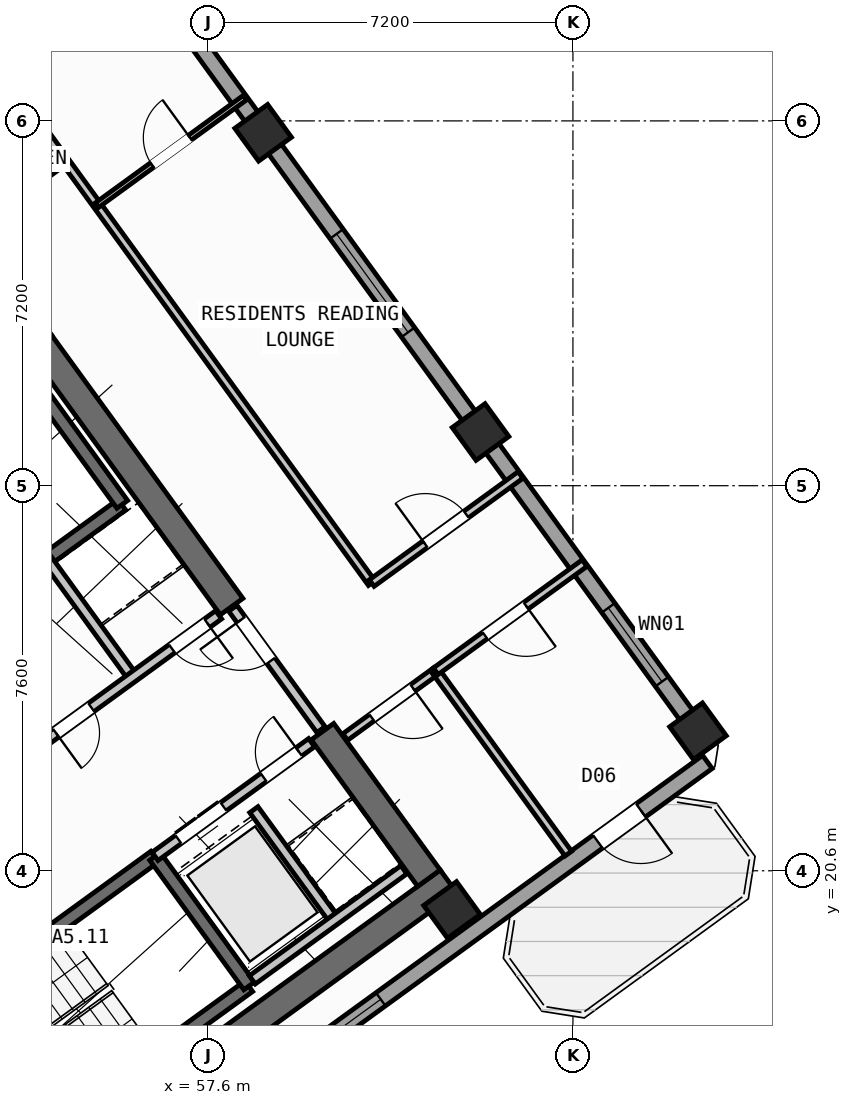
"""IFC4 building model, lengths in metres.
Left out: names, types, materials, properties, quantities, classifications, styles, units other than length and angle.
Written with IfcOpenShell. Run it as: python <this file> out.ifc"""

import sys

from ifc_helpers import new_model, si_unit, direction, frame, frame_2d, origin, origin_2d, place, context, subcontext, project, spatial, rectangle, hollow_rectangle, extrude, source, transform, mapped, element, fill, save


model = new_model("IFC4")
c1 = context("Model", 3, precision=1e-05, world=origin(), true_north=direction((0.0, 1.0)))
c2 = subcontext(c1, "Body", "Model", "MODEL_VIEW")
j1 = project(units=[si_unit("LENGTHUNIT", "METRE"), si_unit("PLANEANGLEUNIT", "RADIAN")], contexts=[c1])
p1 = place(None, origin())
s1 = spatial("IfcSite", under=j1, at=p1, CompositionType="ELEMENT")
p2 = place(p1, origin())
s2 = spatial("IfcBuilding", under=s1, at=p2, CompositionType="ELEMENT")
p3 = place(p2, frame((0.0, 0.0, 179.4)))
s3 = spatial("IfcBuildingStorey", under=s2, at=p3, CompositionType="ELEMENT", Elevation=179.4)
p4 = place(p3, frame((52.359, 13.14, 0.0), z_axis=(0.0, 0.0, 1.0), x_axis=(0.809014896919, 0.587788139183, 0.0)))
e1 = element("IfcWall", 1, at=p4, inside=s3, PredefinedType="SHEAR", context=c2, shape_type="SweptSolid", body=[
    extrude(rectangle(XDim=12.34, YDim=0.55, at=frame_2d((6.17, 0.0))), origin(), (0.0, 0.0, 1.0), 4.55),
])
p5 = place(p3, frame((61.958, 20.454, 0.0), z_axis=(0.0, 0.0, 1.0), x_axis=(-0.587802113096, 0.809004744015, 0.0)))
e2 = element("IfcWall", 2, at=p5, inside=s3, PredefinedType="SHEAR", context=c2, shape_type="SweptSolid", body=[
    extrude(rectangle(XDim=3.575, YDim=0.55, at=frame_2d((1.788, 0.0))), origin(), (0.0, 0.0, 1.0), 4.55),
])
p6 = place(p3, frame((58.064, 25.813, 0.0), z_axis=(0.0, 0.0, 1.0), x_axis=(-0.587764933797, 0.809031756236, 0.0)))
e3 = element("IfcWall", 3, at=p6, inside=s3, PredefinedType="SHEAR", context=c2, shape_type="SweptSolid", body=[
    extrude(rectangle(XDim=6.425, YDim=0.55, at=frame_2d((3.212, 0.0))), origin(), (0.0, 0.0, 1.0), 4.55),
])
m1 = source(origin(), c2, "Body", "SweptSolid", [
    extrude(hollow_rectangle(XDim=0.8, YDim=0.8, WallThickness=0.032, at=origin_2d()), origin(), (0.0, 0.0, 1.0), 4.8),
])
for number, where, z_axis, x_axis in (
    (4, (62.414, 19.827, 0.0), (0.0, 0.0, 1.0), (0.809, 0.588, 0.0)),
    (5, (67.268, 23.354, 0.0), (0.0, 0.0, 1.0), (0.809, 0.588, 0.0)),
    (6, (62.977, 29.259, 0.0), (0.0, 0.0, 1.0), (0.809, 0.588, 0.0)),
    (7, (58.686, 35.165, 0.0), (0.0, 0.0, 1.0), (0.809, 0.588, 0.0)),
):
    element("IfcColumn", number, at=place(p3, frame(where, z_axis=z_axis, x_axis=x_axis)), inside=s3, PredefinedType="COLUMN", context=c2, shape_type="MappedRepresentation", body=[
        mapped(m1, transform((0.0, 0.0, 0.0), scale=1.0)),
    ])
p7 = place(p3, frame((42.207, 31.597, 0.0), z_axis=(0.0, 0.0, 1.0), x_axis=(0.809020333377, 0.587780656523, 0.0)))
e8 = element("IfcWall", 8, at=p7, inside=s3, PredefinedType="STANDARD", context=c2, shape_type="SweptSolid", body=[
    extrude(rectangle(XDim=15.223, YDim=0.32, at=frame_2d((7.611, 0.0))), origin(), (0.0, 0.0, 1.0), 4.55),
])
p8 = place(p7, frame((12.562, 0.0, 0.0)))
e9 = element("IfcOpeningElement", 9, at=p8, cuts=e8, PredefinedType="OPENING", context=c2, shape_type="SweptSolid", body=[
    extrude(rectangle(XDim=1.05, YDim=2.15, at=frame_2d((0.525, 1.075))), frame((0.0, 0.17, 0.0), z_axis=(0.0, -1.0, 0.0), x_axis=(1.0, 0.0, 0.0)), (0.0, 0.0, 1.0), 0.34),
])
p9 = place(p7, frame((2.97, 0.0, 0.75)))
e10 = element("IfcOpeningElement", 10, at=p9, cuts=e8, PredefinedType="OPENING", context=c2, shape_type="SweptSolid", body=[
    extrude(rectangle(XDim=2.4, YDim=1.6, at=frame_2d((1.2, 0.8))), frame((0.0, 0.17, 0.0), z_axis=(0.0, -1.0, 0.0), x_axis=(1.0, 0.0, 0.0)), (0.0, 0.0, 1.0), 0.34),
])
p10 = place(p3, frame((54.81, 40.5, 0.0), z_axis=(0.0, 0.0, 1.0), x_axis=(0.587783625747, -0.809018176127, 0.0)))
e11 = element("IfcWall", 11, at=p10, inside=s3, PredefinedType="STANDARD", context=c2, shape_type="SweptSolid", body=[
    extrude(rectangle(XDim=21.587, YDim=0.32, at=frame_2d((10.794, 0.0))), origin(), (0.0, 0.0, 1.0), 4.025),
])
p11 = place(p10, frame((9.061, 0.0, 0.75)))
e12 = element("IfcOpeningElement", 12, at=p11, cuts=e11, PredefinedType="OPENING", context=c2, shape_type="SweptSolid", body=[
    extrude(rectangle(XDim=2.4, YDim=1.6, at=frame_2d((1.2, 0.8))), frame((0.0, 0.17, 0.0), z_axis=(0.0, -1.0, 0.0), x_axis=(1.0, 0.0, 0.0)), (0.0, 0.0, 1.0), 0.34),
])
p12 = place(p10, frame((18.184, 0.0, 0.85)))
e13 = element("IfcOpeningElement", 13, at=p12, cuts=e11, PredefinedType="OPENING", context=c2, shape_type="SweptSolid", body=[
    extrude(rectangle(XDim=1.8, YDim=1.5, at=frame_2d((0.9, 0.75))), frame((0.0, 0.17, 0.0), z_axis=(0.0, -1.0, 0.0), x_axis=(1.0, 0.0, 0.0)), (0.0, 0.0, 1.0), 0.34),
])
p13 = place(p3, frame((67.454, 22.747, 0.0), z_axis=(0.0, 0.0, 1.0), x_axis=(-0.809021120468, -0.587779573171, 0.0)))
e14 = element("IfcWall", 14, at=p13, inside=s3, PredefinedType="STANDARD", context=c2, shape_type="SweptSolid", body=[
    extrude(rectangle(XDim=17.588, YDim=0.32, at=frame_2d((8.794, 0.0))), origin(), (0.0, 0.0, 1.0), 4.55),
])
p14 = place(p13, frame((1.624, 0.0, 0.0)))
e15 = element("IfcOpeningElement", 15, at=p14, cuts=e14, PredefinedType="OPENING", context=c2, shape_type="SweptSolid", body=[
    extrude(rectangle(XDim=1.05, YDim=2.15, at=frame_2d((0.525, 1.075))), frame((0.0, 0.17, 0.0), z_axis=(0.0, -1.0, 0.0), x_axis=(1.0, 0.0, 0.0)), (0.0, 0.0, 1.0), 0.34),
])
p15 = place(p13, frame((7.969, 0.0, 0.75)))
e16 = element("IfcOpeningElement", 16, at=p15, cuts=e14, PredefinedType="OPENING", context=c2, shape_type="SweptSolid", body=[
    extrude(rectangle(XDim=2.4, YDim=1.6, at=frame_2d((1.2, 0.8))), frame((0.0, 0.17, 0.0), z_axis=(0.0, -1.0, 0.0), x_axis=(1.0, 0.0, 0.0)), (0.0, 0.0, 1.0), 0.34),
])
p16 = place(p13, frame((13.219, 0.0, 0.75)))
e17 = element("IfcOpeningElement", 17, at=p16, cuts=e14, PredefinedType="OPENING", context=c2, shape_type="SweptSolid", body=[
    extrude(rectangle(XDim=2.4, YDim=1.6, at=frame_2d((1.2, 0.8))), frame((0.0, 0.17, 0.0), z_axis=(0.0, -1.0, 0.0), x_axis=(1.0, 0.0, 0.0)), (0.0, 0.0, 1.0), 0.34),
])
p17 = place(p3, frame((49.863, 23.44, 0.0), z_axis=(0.0, 0.0, 1.0), x_axis=(0.809003474932, 0.587803859759, 0.0)))
e18 = element("IfcWall", 18, at=p17, inside=s3, PredefinedType="SHEAR", context=c2, shape_type="SweptSolid", body=[
    extrude(rectangle(XDim=7.46, YDim=0.26, at=frame_2d((3.73, 0.0))), origin(), (0.0, 0.0, 1.0), 4.55),
])
p18 = place(p17, frame((0.36, 0.0, 0.0)))
e19 = element("IfcOpeningElement", 19, at=p18, cuts=e18, PredefinedType="OPENING", context=c2, shape_type="SweptSolid", body=[
    extrude(rectangle(XDim=0.86, YDim=2.05, at=frame_2d((0.43, 1.025))), frame((0.0, 0.14, 0.0), z_axis=(0.0, -1.0, 0.0), x_axis=(1.0, 0.0, 0.0)), (0.0, 0.0, 1.0), 0.28),
])
p19 = place(p3, frame((55.906, 27.831, 0.0), z_axis=(0.0, 0.0, 1.0), x_axis=(-0.587804123638, 0.809003283204, 0.0)))
e20 = element("IfcWall", 20, at=p19, inside=s3, PredefinedType="SHEAR", context=c2, shape_type="SweptSolid", body=[
    extrude(rectangle(XDim=3.16, YDim=0.26, at=frame_2d((1.58, 0.0))), origin(), (0.0, 0.0, 1.0), 4.55),
])
p20 = place(p3, frame((52.472, 14.013, 0.0), z_axis=(0.0, 0.0, 1.0), x_axis=(0.809028366311, 0.587769599847, 0.0)))
e21 = element("IfcWall", 21, at=p20, inside=s3, PredefinedType="SHEAR", context=c2, shape_type="SweptSolid", body=[
    extrude(rectangle(XDim=7.33, YDim=0.26, at=frame_2d((3.665, 0.0))), origin(), (0.0, 0.0, 1.0), 4.55),
])
p21 = place(p3, frame((50.615, 16.57, 0.0), z_axis=(0.0, 0.0, 1.0), x_axis=(0.809028366311, 0.587769599847, 0.0)))
e22 = element("IfcWall", 22, at=p21, inside=s3, PredefinedType="SHEAR", context=c2, shape_type="SweptSolid", body=[
    extrude(rectangle(XDim=7.33, YDim=0.26, at=frame_2d((3.665, 0.0))), origin(), (0.0, 0.0, 1.0), 4.55),
])
p22 = place(p21, frame((0.22, 0.0, 0.0)))
e23 = element("IfcOpeningElement", 23, at=p22, cuts=e22, PredefinedType="OPENING", context=c2, shape_type="SweptSolid", body=[
    extrude(rectangle(XDim=1.1, YDim=2.1, at=frame_2d((0.55, 1.05))), frame((0.0, 0.14, 0.0), z_axis=(0.0, -1.0, 0.0), x_axis=(1.0, 0.0, 0.0)), (0.0, 0.0, 1.0), 0.28),
])
p23 = place(p3, frame((58.41, 18.327, 0.0), z_axis=(0.0, 0.0, 1.0), x_axis=(-0.58776738483, 0.809029975545, 0.0)))
e24 = element("IfcWall", 24, at=p23, inside=s3, PredefinedType="SHEAR", context=c2, shape_type="SweptSolid", body=[
    extrude(rectangle(XDim=3.16, YDim=0.26, at=frame_2d((1.58, 0.0))), origin(), (0.0, 0.0, 1.0), 4.55),
])
p24 = place(p3, frame((56.553, 20.884, 0.0), z_axis=(0.0, 0.0, 1.0), x_axis=(0.809023564264, 0.58777620951, 0.0)))
e25 = element("IfcWall", 25, at=p24, inside=s3, PredefinedType="STANDARD", context=c2, shape_type="SweptSolid", body=[
    extrude(rectangle(XDim=3.818, YDim=0.2, at=frame_2d((1.909, 0.0))), origin(), (0.0, 0.0, 1.0), 4.54),
])
p25 = place(p24, frame((0.57, 0.0, 0.0)))
e26 = element("IfcOpeningElement", 26, at=p25, cuts=e25, PredefinedType="OPENING", context=c2, shape_type="SweptSolid", body=[
    extrude(rectangle(XDim=1.1, YDim=2.15, at=frame_2d((0.55, 1.075))), frame((0.0, 0.11, 0.0), z_axis=(0.0, -1.0, 0.0), x_axis=(1.0, 0.0, 0.0)), (0.0, 0.0, 1.0), 0.22),
])
p26 = place(p24, frame((2.65, 0.0, 0.0)))
e27 = element("IfcOpeningElement", 27, at=p26, cuts=e25, PredefinedType="OPENING", context=c2, shape_type="SweptSolid", body=[
    extrude(rectangle(XDim=0.86, YDim=2.05, at=frame_2d((0.43, 1.025))), frame((0.0, 0.11, 0.0), z_axis=(0.0, -1.0, 0.0), x_axis=(1.0, 0.0, 0.0)), (0.0, 0.0, 1.0), 0.22),
])
p27 = place(p3, frame((60.067, 19.655, 0.0), z_axis=(0.0, 0.0, 1.0), x_axis=(-0.587800520745, 0.809005900975, 0.0)))
e28 = element("IfcWall", 28, at=p27, inside=s3, PredefinedType="STANDARD", context=c2, shape_type="SweptSolid", body=[
    extrude(rectangle(XDim=2.66, YDim=0.2, at=frame_2d((1.33, 0.0))), origin(), (0.0, 0.0, 1.0), 4.54),
])
p28 = place(p3, frame((58.472, 18.447, 0.0), z_axis=(0.0, 0.0, 1.0), x_axis=(0.809018631237, 0.587782999339, 0.0)))
e29 = element("IfcWall", 29, at=p28, inside=s3, PredefinedType="STANDARD", context=c2, shape_type="SweptSolid", body=[
    extrude(rectangle(XDim=3.698, YDim=0.2, at=frame_2d((1.849, 0.0))), origin(), (0.0, 0.0, 1.0), 4.54),
])
p29 = place(p3, frame((56.111, 24.419, 0.0), z_axis=(0.0, 0.0, 1.0), x_axis=(-0.58777848983, 0.809021907548, 0.0)))
e30 = element("IfcWall", 30, at=p29, inside=s3, PredefinedType="STANDARD", context=c2, shape_type="SweptSolid", body=[
    extrude(rectangle(XDim=2.88, YDim=0.2, at=frame_2d((1.44, 0.0))), origin(), (0.0, 0.0, 1.0), 4.54),
])
p30 = place(p3, frame((53.425, 22.468, 0.0), z_axis=(0.0, 0.0, 1.0), x_axis=(0.809024377198, 0.587775090574, 0.0)))
e31 = element("IfcWall", 31, at=p30, inside=s3, PredefinedType="STANDARD", context=c2, shape_type="SweptSolid", body=[
    extrude(rectangle(XDim=5.418, YDim=0.2, at=frame_2d((2.709, 0.0))), origin(), (0.0, 0.0, 1.0), 4.54),
])
p31 = place(p30, frame((4.28, 0.0, 0.0)))
e32 = element("IfcOpeningElement", 32, at=p31, cuts=e31, PredefinedType="OPENING", context=c2, shape_type="SweptSolid", body=[
    extrude(rectangle(XDim=0.86, YDim=2.05, at=frame_2d((0.43, 1.025))), frame((0.0, 0.11, 0.0), z_axis=(0.0, -1.0, 0.0), x_axis=(1.0, 0.0, 0.0)), (0.0, 0.0, 1.0), 0.22),
])
p32 = place(p30, frame((1.45, 0.0, 0.0)))
e33 = element("IfcOpeningElement", 33, at=p32, cuts=e31, PredefinedType="OPENING", context=c2, shape_type="SweptSolid", body=[
    extrude(rectangle(XDim=0.86, YDim=2.05, at=frame_2d((0.43, 1.025))), frame((0.0, 0.11, 0.0), z_axis=(0.0, -1.0, 0.0), x_axis=(1.0, 0.0, 0.0)), (0.0, 0.0, 1.0), 0.22),
])
p33 = place(p3, frame((59.827, 23.386, 0.0), z_axis=(0.0, 0.0, 1.0), x_axis=(-0.587803840107, 0.809003489211, 0.0)))
e34 = element("IfcWall", 34, at=p33, inside=s3, PredefinedType="STANDARD", context=c2, shape_type="SweptSolid", body=[
    extrude(rectangle(XDim=2.96, YDim=0.2, at=frame_2d((1.48, 0.0))), origin(), (0.0, 0.0, 1.0), 4.54),
])
p34 = place(p33, frame((1.68, 0.0, 0.0)))
e35 = element("IfcOpeningElement", 35, at=p34, cuts=e34, PredefinedType="OPENING", context=c2, shape_type="SweptSolid", body=[
    extrude(rectangle(XDim=1.0, YDim=2.1, at=frame_2d((0.5, 1.05))), frame((0.0, 0.11, 0.0), z_axis=(0.0, -1.0, 0.0), x_axis=(1.0, 0.0, 0.0)), (0.0, 0.0, 1.0), 0.22),
])
p35 = place(p3, frame((60.307, 23.24, 0.0), z_axis=(0.0, 0.0, 1.0), x_axis=(0.80898466188, 0.58782975158, 0.0)))
e36 = element("IfcWall", 36, at=p35, inside=s3, PredefinedType="PARTITIONING", context=c2, shape_type="SweptSolid", body=[
    extrude(rectangle(XDim=2.208, YDim=0.16, at=frame_2d((1.104, 0.0))), origin(), (0.0, 0.0, 1.0), 4.54),
])
p36 = place(p35, frame((0.648, 0.0, 0.0)))
e37 = element("IfcOpeningElement", 37, at=p36, cuts=e36, PredefinedType="OPENING", context=c2, shape_type="SweptSolid", body=[
    extrude(rectangle(XDim=1.0, YDim=2.1, at=frame_2d((0.5, 1.05))), frame((0.0, 0.09, 0.0), z_axis=(0.0, -1.0, 0.0), x_axis=(1.0, 0.0, 0.0)), (0.0, 0.0, 1.0), 0.18),
])
p37 = place(p3, frame((52.739, 33.143, 0.0), z_axis=(0.0, 0.0, 1.0), x_axis=(0.809000999347, 0.58780726693, 0.0)))
e38 = element("IfcWall", 38, at=p37, inside=s3, PredefinedType="PARTITIONING", context=c2, shape_type="SweptSolid", body=[
    extrude(rectangle(XDim=2.51, YDim=0.16, at=frame_2d((1.255, 0.0))), origin(), (0.0, 0.0, 1.0), 4.54),
])
p38 = place(p3, frame((64.709, 20.938, 0.0), z_axis=(0.0, 0.0, 1.0), x_axis=(-0.587773666605, 0.809025411743, 0.0)))
e39 = element("IfcWall", 39, at=p38, inside=s3, PredefinedType="PARTITIONING", context=c2, shape_type="SweptSolid", body=[
    extrude(rectangle(XDim=4.45, YDim=0.16, at=frame_2d((2.225, 0.0))), origin(), (0.0, 0.0, 1.0), 4.54),
])
p39 = place(p3, frame((60.829, 26.278, 0.0), z_axis=(0.0, 0.0, 1.0), x_axis=(-0.587777474174, 0.809022645451, 0.0)))
e40 = element("IfcWall", 40, at=p39, inside=s3, PredefinedType="PARTITIONING", context=c2, shape_type="SweptSolid", body=[
    extrude(rectangle(XDim=15.1, YDim=0.16, at=frame_2d((7.55, 0.0))), origin(), (0.0, 0.0, 1.0), 4.54),
])
p40 = place(p3, frame((62.093, 24.538, 0.0), z_axis=(0.0, 0.0, 1.0), x_axis=(0.809035546126, 0.58775971715, 0.0)))
e41 = element("IfcWall", 41, at=p40, inside=s3, PredefinedType="PARTITIONING", context=c2, shape_type="SweptSolid", body=[
    extrude(rectangle(XDim=3.63, YDim=0.16, at=frame_2d((1.815, 0.0))), origin(), (0.0, 0.0, 1.0), 4.54),
])
p41 = place(p40, frame((1.2, 0.0, 0.0)))
e42 = element("IfcOpeningElement", 42, at=p41, cuts=e41, PredefinedType="OPENING", context=c2, shape_type="SweptSolid", body=[
    extrude(rectangle(XDim=1.0, YDim=2.1, at=frame_2d((0.5, 1.05))), frame((0.0, 0.09, 0.0), z_axis=(0.0, -1.0, 0.0), x_axis=(1.0, 0.0, 0.0)), (0.0, 0.0, 1.0), 0.18),
])
p42 = place(p3, frame((60.829, 26.278, 0.0), z_axis=(0.0, 0.0, 1.0), x_axis=(0.809003564202, 0.587803736896, 0.0)))
e43 = element("IfcWall", 43, at=p42, inside=s3, PredefinedType="PARTITIONING", context=c2, shape_type="SweptSolid", body=[
    extrude(rectangle(XDim=3.63, YDim=0.16, at=frame_2d((1.815, 0.0))), origin(), (0.0, 0.0, 1.0), 4.54),
])
p43 = place(p42, frame((1.305, 0.0, 0.0)))
e44 = element("IfcOpeningElement", 44, at=p43, cuts=e43, PredefinedType="OPENING", context=c2, shape_type="SweptSolid", body=[
    extrude(rectangle(XDim=1.0, YDim=2.1, at=frame_2d((0.5, 1.05))), frame((0.0, 0.09, 0.0), z_axis=(0.0, -1.0, 0.0), x_axis=(1.0, 0.0, 0.0)), (0.0, 0.0, 1.0), 0.18),
])
p44 = place(p3, frame((55.409, 33.738, 0.0), z_axis=(0.0, 0.0, 1.0), x_axis=(0.809005039917, 0.58780170584, 0.0)))
e45 = element("IfcWall", 45, at=p44, inside=s3, PredefinedType="PARTITIONING", context=c2, shape_type="SweptSolid", body=[
    extrude(rectangle(XDim=3.61, YDim=0.11, at=frame_2d((1.805, 0.0))), origin(), (0.0, 0.0, 1.0), 4.54),
])
p45 = place(p44, frame((1.345, 0.0, 0.0)))
e46 = element("IfcOpeningElement", 46, at=p45, cuts=e45, PredefinedType="OPENING", context=c2, shape_type="SweptSolid", body=[
    extrude(rectangle(XDim=0.92, YDim=2.08, at=frame_2d((0.46, 1.04))), frame((0.0, 0.065, 0.0), z_axis=(0.0, -1.0, 0.0), x_axis=(1.0, 0.0, 0.0)), (0.0, 0.0, 1.0), 0.13),
])
p46 = place(p3, frame((42.866, 26.044, 0.0), z_axis=(0.0, 0.0, 1.0), x_axis=(0.809020254154, 0.587780765566, 0.0)))
e47 = element("IfcWall", 47, at=p46, inside=s3, PredefinedType="PARTITIONING", context=c2, shape_type="SweptSolid", body=[
    extrude(rectangle(XDim=14.67, YDim=0.16, at=frame_2d((7.335, 0.0))), origin(), (0.0, 0.0, 1.0), 4.54),
])
p47 = place(p46, frame((10.08, 0.0, 0.0)))
e48 = element("IfcOpeningElement", 48, at=p47, cuts=e47, PredefinedType="OPENING", context=c2, shape_type="SweptSolid", body=[
    extrude(rectangle(XDim=1.0, YDim=2.1, at=frame_2d((0.5, 1.05))), frame((0.0, 0.09, 0.0), z_axis=(0.0, -1.0, 0.0), x_axis=(1.0, 0.0, 0.0)), (0.0, 0.0, 1.0), 0.18),
])
m2 = source(origin(), c2, "Body", "SweptSolid", [
    extrude(rectangle(XDim=1.05, YDim=2.15, at=frame_2d((0.525, 1.075))), frame((0.0, 0.025, 0.0), z_axis=(0.0, -1.0, 0.0), x_axis=(1.0, 0.0, 0.0)), (0.0, 0.0, 1.0), 0.05),
])
p48 = place(p14, origin())
e49 = element("IfcDoor", 49, at=p48, inside=s3, OperationType="SINGLE_SWING_LEFT", PredefinedType="DOOR", context=c2, shape_type="MappedRepresentation", body=[
    mapped(m2, transform((0.0, 0.0, 0.0), scale=1.0)),
])
fill(e15, e49)
m3 = source(origin(), c2, "Body", "SweptSolid", [
    extrude(rectangle(XDim=2.4, YDim=1.6, at=frame_2d((1.2, 0.8))), frame((0.0, 0.03, 0.0), z_axis=(0.0, -1.0, 0.0), x_axis=(1.0, 0.0, 0.0)), (0.0, 0.0, 1.0), 0.06),
])
p49 = place(p11, origin())
e50 = element("IfcWindow", 50, at=p49, inside=s3, PartitioningType="SINGLE_PANEL", PredefinedType="WINDOW", context=c2, shape_type="MappedRepresentation", body=[
    mapped(m3, transform((0.0, 0.0, 0.0), scale=1.0)),
])
fill(e12, e50)
m4 = source(origin(), c2, "Body", "SweptSolid", [
    extrude(rectangle(XDim=1.8, YDim=1.5, at=frame_2d((0.9, 0.75))), frame((0.0, 0.03, 0.0), z_axis=(0.0, -1.0, 0.0), x_axis=(1.0, 0.0, 0.0)), (0.0, 0.0, 1.0), 0.06),
])
p50 = place(p12, origin())
e51 = element("IfcWindow", 51, at=p50, inside=s3, PartitioningType="SINGLE_PANEL", PredefinedType="WINDOW", context=c2, shape_type="MappedRepresentation", body=[
    mapped(m4, transform((0.0, 0.0, 0.0), scale=1.0)),
])
fill(e13, e51)
p51 = place(p15, origin())
e52 = element("IfcWindow", 52, at=p51, inside=s3, PartitioningType="SINGLE_PANEL", PredefinedType="WINDOW", context=c2, shape_type="MappedRepresentation", body=[
    mapped(m3, transform((0.0, 0.0, 0.0), scale=1.0)),
])
fill(e16, e52)
m5 = source(origin(), c2, "Body", "SweptSolid", [
    extrude(rectangle(XDim=1.1, YDim=2.15, at=frame_2d((0.55, 1.075))), frame((0.0, 0.025, 0.0), z_axis=(0.0, -1.0, 0.0), x_axis=(1.0, 0.0, 0.0)), (0.0, 0.0, 1.0), 0.05),
])
p52 = place(p25, origin())
e53 = element("IfcDoor", 53, at=p52, inside=s3, OperationType="DOUBLE_DOOR_SLIDING", PredefinedType="DOOR", context=c2, shape_type="MappedRepresentation", body=[
    mapped(m5, transform((0.0, 0.0, 0.0), scale=1.0)),
])
fill(e26, e53)
m6 = source(origin(), c2, "Body", "SweptSolid", [
    extrude(rectangle(XDim=0.86, YDim=2.05, at=frame_2d((0.43, 1.025))), frame((0.0, 0.025, 0.0), z_axis=(0.0, -1.0, 0.0), x_axis=(1.0, 0.0, 0.0)), (0.0, 0.0, 1.0), 0.05),
])
p53 = place(p26, origin())
e54 = element("IfcDoor", 54, at=p53, inside=s3, OperationType="SINGLE_SWING_RIGHT", PredefinedType="DOOR", context=c2, shape_type="MappedRepresentation", body=[
    mapped(m6, transform((0.0, 0.0, 0.0), scale=1.0)),
])
fill(e27, e54)
p54 = place(p31, frame((0.86, 0.0, 0.0), z_axis=(0.0, 0.0, 1.0), x_axis=(-1.0, 0.0, 0.0)))
e55 = element("IfcDoor", 55, at=p54, inside=s3, OperationType="SINGLE_SWING_LEFT", PredefinedType="DOOR", context=c2, shape_type="MappedRepresentation", body=[
    mapped(m6, transform((0.0, 0.0, 0.0), scale=1.0)),
])
fill(e32, e55)
p55 = place(p32, frame((0.86, 0.0, 0.0), z_axis=(0.0, 0.0, 1.0), x_axis=(-1.0, 0.0, 0.0)))
e56 = element("IfcDoor", 56, at=p55, inside=s3, OperationType="SINGLE_SWING_RIGHT", PredefinedType="DOOR", context=c2, shape_type="MappedRepresentation", body=[
    mapped(m6, transform((0.0, 0.0, 0.0), scale=1.0)),
])
fill(e33, e56)
m7 = source(origin(), c2, "Body", "SweptSolid", [
    extrude(rectangle(XDim=1.0, YDim=2.1, at=frame_2d((0.5, 1.05))), frame((0.0, 0.025, 0.0), z_axis=(0.0, -1.0, 0.0), x_axis=(1.0, 0.0, 0.0)), (0.0, 0.0, 1.0), 0.05),
])
p56 = place(p36, frame((1.0, 0.0, 0.0), z_axis=(0.0, 0.0, 1.0), x_axis=(-1.0, 0.0, 0.0)))
e57 = element("IfcDoor", 57, at=p56, inside=s3, OperationType="SINGLE_SWING_LEFT", PredefinedType="DOOR", context=c2, shape_type="MappedRepresentation", body=[
    mapped(m7, transform((0.0, 0.0, 0.0), scale=1.0)),
])
fill(e37, e57)
p57 = place(p34, origin())
e58 = element("IfcDoor", 58, at=p57, inside=s3, OperationType="SINGLE_SWING_RIGHT", PredefinedType="DOOR", context=c2, shape_type="MappedRepresentation", body=[
    mapped(m7, transform((0.0, 0.0, 0.0), scale=1.0)),
])
fill(e35, e58)
p58 = place(p43, origin())
e59 = element("IfcDoor", 59, at=p58, inside=s3, OperationType="SINGLE_SWING_LEFT", PredefinedType="DOOR", context=c2, shape_type="MappedRepresentation", body=[
    mapped(m7, transform((0.0, 0.0, 0.0), scale=1.0)),
])
fill(e44, e59)
m8 = source(origin(), c2, "Body", "SweptSolid", [
    extrude(rectangle(XDim=0.92, YDim=2.08, at=frame_2d((0.46, 1.04))), frame((0.0, 0.025, 0.0), z_axis=(0.0, -1.0, 0.0), x_axis=(1.0, 0.0, 0.0)), (0.0, 0.0, 1.0), 0.05),
])
p59 = place(p45, origin())
e60 = element("IfcDoor", 60, at=p59, inside=s3, OperationType="SINGLE_SWING_RIGHT", PredefinedType="DOOR", context=c2, shape_type="MappedRepresentation", body=[
    mapped(m8, transform((0.0, 0.0, 0.0), scale=1.0)),
])
fill(e46, e60)
p60 = place(p41, frame((1.0, 0.0, 0.0), z_axis=(0.0, 0.0, 1.0), x_axis=(-1.0, 0.0, 0.0)))
e61 = element("IfcDoor", 61, at=p60, inside=s3, OperationType="SINGLE_SWING_LEFT", PredefinedType="DOOR", context=c2, shape_type="MappedRepresentation", body=[
    mapped(m7, transform((0.0, 0.0, 0.0), scale=1.0)),
])
fill(e42, e61)
save(model, sys.argv[1])
